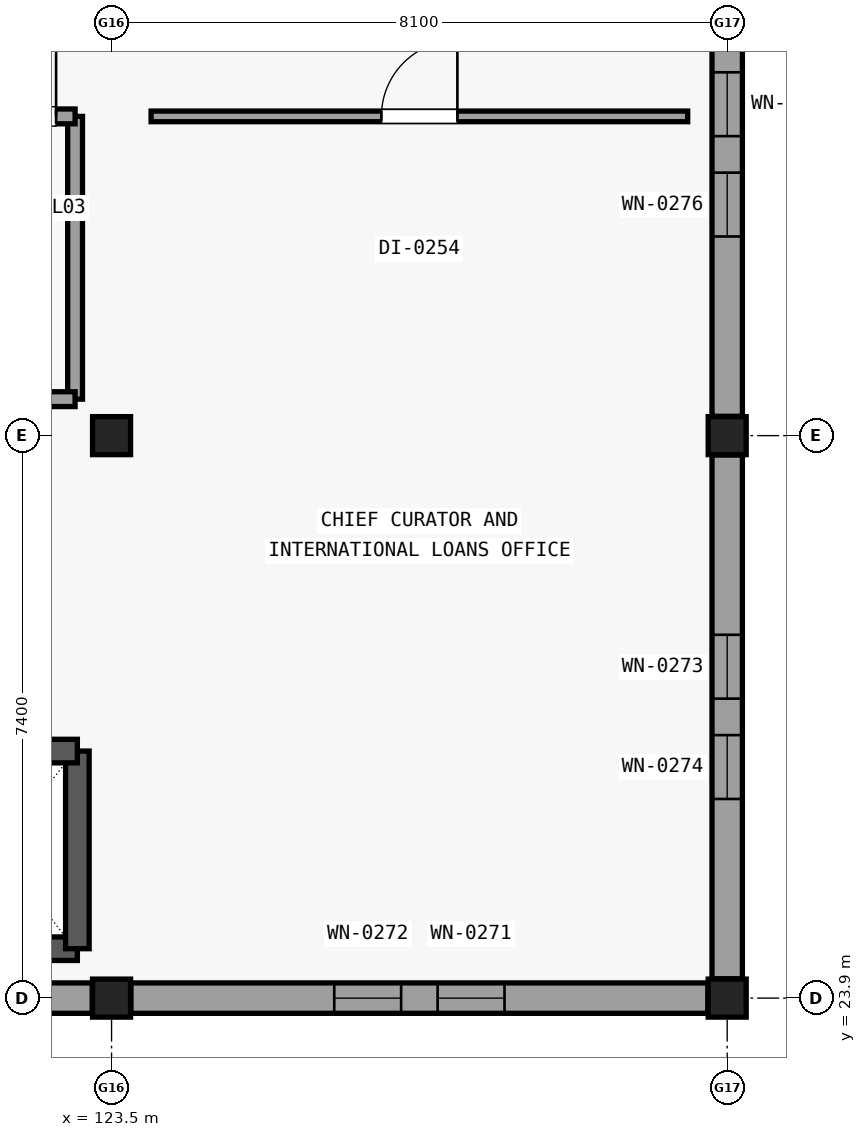
"""IFC4 building model, lengths in metres.
Left out: names, types, materials, properties, quantities, classifications, styles, units other than length and angle.
Written with IfcOpenShell. Run it as: python <this file> out.ifc"""

import sys

from ifc_helpers import new_model, si_unit, direction, frame, frame_2d, origin, origin_2d, place, context, subcontext, project, spatial, rectangle, extrude, element, fill, save


model = new_model("IFC4")
c1 = context("Model", 3, precision=1e-05, world=origin(), true_north=direction((0.0, 1.0)))
c2 = subcontext(c1, "Body", "Model", "MODEL_VIEW")
j1 = project(units=[si_unit("LENGTHUNIT", "METRE"), si_unit("PLANEANGLEUNIT", "RADIAN")], contexts=[c1])
p1 = place(None, origin())
s1 = spatial("IfcSite", under=j1, at=p1, CompositionType="ELEMENT")
p2 = place(p1, origin())
s2 = spatial("IfcBuilding", under=s1, at=p2, CompositionType="ELEMENT")
p3 = place(p2, frame((0.0, 0.0, 13.8)))
s3 = spatial("IfcBuildingStorey", under=s2, at=p3, CompositionType="ELEMENT", Elevation=13.8)
for number, where, z_axis, x_axis in (
    (1, (123.5, 23.9, 0.0), (0.0, 0.0, 1.0), (1.0, 0.0, 0.0)),
    (2, (123.5, 31.3, 0.0), (0.0, 0.0, 1.0), (1.0, 0.0, 0.0)),
    (3, (131.6, 23.9, 0.0), (0.0, 0.0, 1.0), (1.0, 0.0, 0.0)),
    (4, (131.6, 31.3, 0.0), (0.0, 0.0, 1.0), (1.0, 0.0, 0.0)),
):
    element("IfcColumn", number, at=place(p3, frame(where, z_axis=z_axis, x_axis=x_axis)), inside=s3, PredefinedType="COLUMN", context=c2, shape_type="SweptSolid", body=[
        extrude(rectangle(XDim=0.5, YDim=0.5, at=origin_2d()), origin(), (0.0, 0.0, 1.0), 3.38),
    ])
p4 = place(p3, frame((123.246, 23.9, 0.0), z_axis=(0.0, 0.0, 1.0), x_axis=(-1.0, 0.0, 0.0)))
e5 = element("IfcWall", 5, at=p4, inside=s3, PredefinedType="SOLIDWALL", context=c2, shape_type="SweptSolid", body=[
    extrude(rectangle(XDim=7.592, YDim=0.4, at=frame_2d((3.796, 0.0))), origin(), (0.0, 0.0, 1.0), 2.908),
])
p5 = place(p4, frame((2.676, 0.0, 0.6)))
e6 = element("IfcOpeningElement", 6, at=p5, cuts=e5, PredefinedType="OPENING", context=c2, shape_type="SweptSolid", body=[
    extrude(rectangle(XDim=0.88, YDim=1.9, at=frame_2d((0.44, 0.95))), frame((0.0, 0.21, 0.0), z_axis=(0.0, -1.0, 0.0), x_axis=(1.0, 0.0, 0.0)), (0.0, 0.0, 1.0), 0.42),
])
p6 = place(p4, frame((4.036, 0.0, 0.6)))
e7 = element("IfcOpeningElement", 7, at=p6, cuts=e5, PredefinedType="OPENING", context=c2, shape_type="SweptSolid", body=[
    extrude(rectangle(XDim=0.88, YDim=1.9, at=frame_2d((0.44, 0.95))), frame((0.0, 0.21, 0.0), z_axis=(0.0, -1.0, 0.0), x_axis=(1.0, 0.0, 0.0)), (0.0, 0.0, 1.0), 0.42),
])
p7 = place(p3, frame((131.346, 23.9, 0.0), z_axis=(0.0, 0.0, 1.0), x_axis=(-1.0, 0.0, 0.0)))
e8 = element("IfcWall", 8, at=p7, inside=s3, PredefinedType="SOLIDWALL", context=c2, shape_type="SweptSolid", body=[
    extrude(rectangle(XDim=7.592, YDim=0.4, at=frame_2d((3.796, 0.0))), origin(), (0.0, 0.0, 1.0), 2.908),
])
p8 = place(p7, frame((2.676, 0.0, 0.6)))
e9 = element("IfcOpeningElement", 9, at=p8, cuts=e8, PredefinedType="OPENING", context=c2, shape_type="SweptSolid", body=[
    extrude(rectangle(XDim=0.88, YDim=1.9, at=frame_2d((0.44, 0.95))), frame((0.0, 0.21, 0.0), z_axis=(0.0, -1.0, 0.0), x_axis=(1.0, 0.0, 0.0)), (0.0, 0.0, 1.0), 0.42),
])
p9 = place(p7, frame((4.036, 0.0, 0.6)))
e10 = element("IfcOpeningElement", 10, at=p9, cuts=e8, PredefinedType="OPENING", context=c2, shape_type="SweptSolid", body=[
    extrude(rectangle(XDim=0.88, YDim=1.9, at=frame_2d((0.44, 0.95))), frame((0.0, 0.21, 0.0), z_axis=(0.0, -1.0, 0.0), x_axis=(1.0, 0.0, 0.0)), (0.0, 0.0, 1.0), 0.42),
])
p10 = place(p3, frame((131.6, 31.046, 0.0), z_axis=(0.0, 0.0, 1.0), x_axis=(0.0, -1.0, 0.0)))
e11 = element("IfcWall", 11, at=p10, inside=s3, PredefinedType="SOLIDWALL", context=c2, shape_type="SweptSolid", body=[
    extrude(rectangle(XDim=6.892, YDim=0.4, at=frame_2d((3.446, 0.0))), origin(), (0.0, 0.0, 1.0), 2.908),
])
p11 = place(p10, frame((2.366, 0.0, 0.6)))
e12 = element("IfcOpeningElement", 12, at=p11, cuts=e11, PredefinedType="OPENING", context=c2, shape_type="SweptSolid", body=[
    extrude(rectangle(XDim=0.84, YDim=1.96, at=frame_2d((0.42, 0.98))), frame((0.0, 0.21, 0.0), z_axis=(0.0, -1.0, 0.0), x_axis=(1.0, 0.0, 0.0)), (0.0, 0.0, 1.0), 0.42),
])
p12 = place(p10, frame((3.686, 0.0, 0.6)))
e13 = element("IfcOpeningElement", 13, at=p12, cuts=e11, PredefinedType="OPENING", context=c2, shape_type="SweptSolid", body=[
    extrude(rectangle(XDim=0.84, YDim=1.96, at=frame_2d((0.42, 0.98))), frame((0.0, 0.21, 0.0), z_axis=(0.0, -1.0, 0.0), x_axis=(1.0, 0.0, 0.0)), (0.0, 0.0, 1.0), 0.42),
])
p13 = place(p3, frame((131.6, 38.446, 0.0), z_axis=(0.0, 0.0, 1.0), x_axis=(0.0, -1.0, 0.0)))
e14 = element("IfcWall", 14, at=p13, inside=s3, PredefinedType="SOLIDWALL", context=c2, shape_type="SweptSolid", body=[
    extrude(rectangle(XDim=6.892, YDim=0.4, at=frame_2d((3.446, 0.0))), origin(), (0.0, 0.0, 1.0), 2.908),
])
p14 = place(p13, frame((2.366, 0.0, 0.6)))
e15 = element("IfcOpeningElement", 15, at=p14, cuts=e14, PredefinedType="OPENING", context=c2, shape_type="SweptSolid", body=[
    extrude(rectangle(XDim=0.84, YDim=1.96, at=frame_2d((0.42, 0.98))), frame((0.0, 0.21, 0.0), z_axis=(0.0, -1.0, 0.0), x_axis=(1.0, 0.0, 0.0)), (0.0, 0.0, 1.0), 0.42),
])
p15 = place(p13, frame((3.686, 0.0, 0.6)))
e16 = element("IfcOpeningElement", 16, at=p15, cuts=e14, PredefinedType="OPENING", context=c2, shape_type="SweptSolid", body=[
    extrude(rectangle(XDim=0.84, YDim=1.96, at=frame_2d((0.42, 0.98))), frame((0.0, 0.21, 0.0), z_axis=(0.0, -1.0, 0.0), x_axis=(1.0, 0.0, 0.0)), (0.0, 0.0, 1.0), 0.42),
])
p16 = place(p3, frame((120.95, 24.55, 0.0), z_axis=(0.0, 0.0, 1.0), x_axis=(1.0, 0.0, 0.0)))
e17 = element("IfcWall", 17, at=p16, inside=s3, PredefinedType="SHEAR", context=c2, shape_type="SweptSolid", body=[
    extrude(rectangle(XDim=2.1, YDim=0.31, at=frame_2d((1.05, 0.0))), origin(), (0.0, 0.0, 1.0), 3.375),
])
p17 = place(p3, frame((123.05, 24.55, 0.0), z_axis=(0.0, 0.0, 1.0), x_axis=(0.0, 1.0, 0.0)))
e18 = element("IfcWall", 18, at=p17, inside=s3, PredefinedType="SHEAR", context=c2, shape_type="SweptSolid", body=[
    extrude(rectangle(XDim=2.6, YDim=0.31, at=frame_2d((1.3, 0.0))), origin(), (0.0, 0.0, 1.0), 3.375),
])
p18 = place(p3, frame((120.95, 27.15, 0.0), z_axis=(0.0, 0.0, 1.0), x_axis=(1.0, 0.0, 0.0)))
e19 = element("IfcWall", 19, at=p18, inside=s3, PredefinedType="SHEAR", context=c2, shape_type="SweptSolid", body=[
    extrude(rectangle(XDim=2.1, YDim=0.31, at=frame_2d((1.05, 0.0))), origin(), (0.0, 0.0, 1.0), 3.375),
])
p19 = place(p18, frame((0.5, 0.0, 0.0)))
e20 = element("IfcOpeningElement", 20, at=p19, cuts=e19, PredefinedType="OPENING", context=c2, shape_type="SweptSolid", body=[
    extrude(rectangle(XDim=1.1, YDim=2.15, at=frame_2d((0.55, 1.075))), frame((0.0, 0.165, 0.0), z_axis=(0.0, -1.0, 0.0), x_axis=(1.0, 0.0, 0.0)), (0.0, 0.0, 1.0), 0.33),
])
p20 = place(p3, frame((123.02, 31.78, 0.0), z_axis=(0.0, 0.0, 1.0), x_axis=(0.0, 1.0, 0.0)))
e21 = element("IfcWall", 21, at=p20, inside=s3, PredefinedType="PARTITIONING", context=c2, shape_type="SweptSolid", body=[
    extrude(rectangle(XDim=3.72, YDim=0.195, at=frame_2d((1.86, 0.0))), origin(), (0.0, 0.0, 1.0), 2.913),
])
p21 = place(p3, frame((120.05, 31.78, 0.0), z_axis=(0.0, 0.0, 1.0), x_axis=(1.0, 0.0, 0.0)))
e22 = element("IfcWall", 22, at=p21, inside=s3, PredefinedType="PARTITIONING", context=c2, shape_type="SweptSolid", body=[
    extrude(rectangle(XDim=2.97, YDim=0.195, at=frame_2d((1.485, 0.0))), origin(), (0.0, 0.0, 1.0), 2.913),
])
p22 = place(p3, frame((120.05, 35.5, 0.0), z_axis=(0.0, 0.0, 1.0), x_axis=(1.0, 0.0, 0.0)))
e23 = element("IfcWall", 23, at=p22, inside=s3, PredefinedType="PARTITIONING", context=c2, shape_type="SweptSolid", body=[
    extrude(rectangle(XDim=2.97, YDim=0.195, at=frame_2d((1.485, 0.0))), origin(), (0.0, 0.0, 1.0), 2.913),
])
p23 = place(p22, frame((0.25, 0.0, 0.0)))
e24 = element("IfcOpeningElement", 24, at=p23, cuts=e23, PredefinedType="OPENING", context=c2, shape_type="SweptSolid", body=[
    extrude(rectangle(XDim=0.95, YDim=2.1, at=frame_2d((0.475, 1.05))), frame((0.0, 0.107, 0.0), z_axis=(0.0, -1.0, 0.0), x_axis=(1.0, 0.0, 0.0)), (0.0, 0.0, 1.0), 0.215),
])
p24 = place(p22, frame((1.82, 0.0, 0.0)))
e25 = element("IfcOpeningElement", 25, at=p24, cuts=e23, PredefinedType="OPENING", context=c2, shape_type="SweptSolid", body=[
    extrude(rectangle(XDim=0.9, YDim=2.1, at=frame_2d((0.45, 1.05))), frame((0.0, 0.107, 0.0), z_axis=(0.0, -1.0, 0.0), x_axis=(1.0, 0.0, 0.0)), (0.0, 0.0, 1.0), 0.215),
])
p25 = place(p3, frame((124.02, 35.5, 0.0), z_axis=(0.0, 0.0, 1.0), x_axis=(1.0, 0.0, 0.0)))
e26 = element("IfcWall", 26, at=p25, inside=s3, PredefinedType="PARTITIONING", context=c2, shape_type="SweptSolid", body=[
    extrude(rectangle(XDim=7.06, YDim=0.14, at=frame_2d((3.53, 0.0))), origin(), (0.0, 0.0, 1.0), 2.913),
])
p26 = place(p25, frame((3.03, 0.0, 0.0)))
e27 = element("IfcOpeningElement", 27, at=p26, cuts=e26, PredefinedType="OPENING", context=c2, shape_type="SweptSolid", body=[
    extrude(rectangle(XDim=1.0, YDim=2.12, at=frame_2d((0.5, 1.06))), frame((0.0, 0.08, 0.0), z_axis=(0.0, -1.0, 0.0), x_axis=(1.0, 0.0, 0.0)), (0.0, 0.0, 1.0), 0.16),
])
p27 = place(p8, origin())
e28 = element("IfcWindow", 28, at=p27, inside=s3, PartitioningType="SINGLE_PANEL", PredefinedType="WINDOW", context=c2, shape_type="SweptSolid", body=[
    extrude(rectangle(XDim=0.88, YDim=1.9, at=frame_2d((0.44, 0.95))), frame((0.0, 0.03, 0.0), z_axis=(0.0, -1.0, 0.0), x_axis=(1.0, 0.0, 0.0)), (0.0, 0.0, 1.0), 0.06),
])
fill(e9, e28)
p28 = place(p9, origin())
e29 = element("IfcWindow", 29, at=p28, inside=s3, PartitioningType="SINGLE_PANEL", PredefinedType="WINDOW", context=c2, shape_type="SweptSolid", body=[
    extrude(rectangle(XDim=0.88, YDim=1.9, at=frame_2d((0.44, 0.95))), frame((0.0, 0.03, 0.0), z_axis=(0.0, -1.0, 0.0), x_axis=(1.0, 0.0, 0.0)), (0.0, 0.0, 1.0), 0.06),
])
fill(e10, e29)
p29 = place(p11, origin())
e30 = element("IfcWindow", 30, at=p29, inside=s3, PartitioningType="SINGLE_PANEL", PredefinedType="WINDOW", context=c2, shape_type="SweptSolid", body=[
    extrude(rectangle(XDim=0.84, YDim=1.96, at=frame_2d((0.42, 0.98))), frame((0.0, 0.03, 0.0), z_axis=(0.0, -1.0, 0.0), x_axis=(1.0, 0.0, 0.0)), (0.0, 0.0, 1.0), 0.06),
])
fill(e12, e30)
p30 = place(p12, origin())
e31 = element("IfcWindow", 31, at=p30, inside=s3, PartitioningType="SINGLE_PANEL", PredefinedType="WINDOW", context=c2, shape_type="SweptSolid", body=[
    extrude(rectangle(XDim=0.84, YDim=1.96, at=frame_2d((0.42, 0.98))), frame((0.0, 0.03, 0.0), z_axis=(0.0, -1.0, 0.0), x_axis=(1.0, 0.0, 0.0)), (0.0, 0.0, 1.0), 0.06),
])
fill(e13, e31)
p31 = place(p14, origin())
e32 = element("IfcWindow", 32, at=p31, inside=s3, PartitioningType="SINGLE_PANEL", PredefinedType="WINDOW", context=c2, shape_type="SweptSolid", body=[
    extrude(rectangle(XDim=0.84, YDim=1.96, at=frame_2d((0.42, 0.98))), frame((0.0, 0.03, 0.0), z_axis=(0.0, -1.0, 0.0), x_axis=(1.0, 0.0, 0.0)), (0.0, 0.0, 1.0), 0.06),
])
fill(e15, e32)
p32 = place(p15, origin())
e33 = element("IfcWindow", 33, at=p32, inside=s3, PartitioningType="SINGLE_PANEL", PredefinedType="WINDOW", context=c2, shape_type="SweptSolid", body=[
    extrude(rectangle(XDim=0.84, YDim=1.96, at=frame_2d((0.42, 0.98))), frame((0.0, 0.03, 0.0), z_axis=(0.0, -1.0, 0.0), x_axis=(1.0, 0.0, 0.0)), (0.0, 0.0, 1.0), 0.06),
])
fill(e16, e33)
p33 = place(p24, origin())
e34 = element("IfcDoor", 34, at=p33, inside=s3, OperationType="SINGLE_SWING_RIGHT", PredefinedType="DOOR", context=c2, shape_type="SweptSolid", body=[
    extrude(rectangle(XDim=0.9, YDim=2.1, at=frame_2d((0.45, 1.05))), frame((0.0, 0.025, 0.0), z_axis=(0.0, -1.0, 0.0), x_axis=(1.0, 0.0, 0.0)), (0.0, 0.0, 1.0), 0.05),
])
fill(e25, e34)
p34 = place(p26, origin())
e35 = element("IfcDoor", 35, at=p34, inside=s3, OperationType="SINGLE_SWING_RIGHT", PredefinedType="DOOR", context=c2, shape_type="SweptSolid", body=[
    extrude(rectangle(XDim=1.0, YDim=2.12, at=frame_2d((0.5, 1.06))), frame((0.0, 0.025, 0.0), z_axis=(0.0, -1.0, 0.0), x_axis=(1.0, 0.0, 0.0)), (0.0, 0.0, 1.0), 0.05),
])
fill(e27, e35)
save(model, sys.argv[1])
